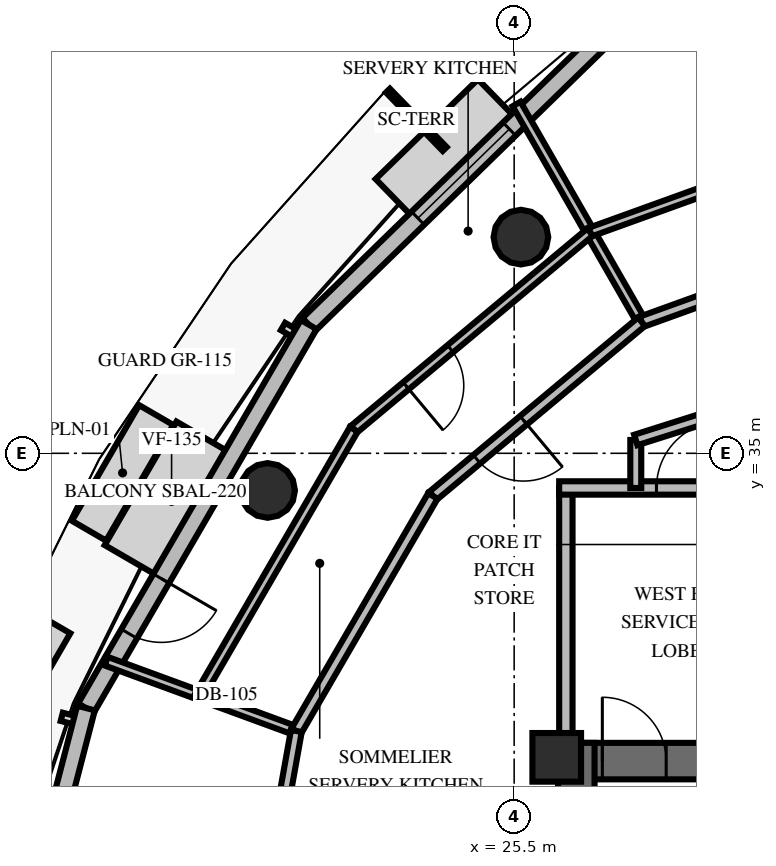
"""IFC4 building model, lengths in metres.
Left out: names, types, materials, properties, quantities, classifications, styles, units other than length and angle.
Written with IfcOpenShell. Run it as: python <this file> out.ifc"""

import sys

from ifc_helpers import new_model, si_unit, direction, frame, frame_2d, origin, origin_2d, place, context, subcontext, project, spatial, rectangle, circle, extrude, element, fill, save


model = new_model("IFC4")
c1 = context("Model", 3, precision=1e-05, world=origin(), true_north=direction((0.0, 1.0)))
c2 = subcontext(c1, "Body", "Model", "MODEL_VIEW")
j1 = project(units=[si_unit("LENGTHUNIT", "METRE"), si_unit("PLANEANGLEUNIT", "RADIAN")], contexts=[c1])
p1 = place(None, origin())
s1 = spatial("IfcSite", under=j1, at=p1, CompositionType="ELEMENT")
p2 = place(p1, origin())
s2 = spatial("IfcBuilding", under=s1, at=p2, CompositionType="ELEMENT")
p3 = place(p2, frame((0.0, 0.0, 277.2)))
s3 = spatial("IfcBuildingStorey", under=s2, at=p3, CompositionType="ELEMENT", Elevation=277.2)
p4 = place(p3, frame((26.222, 29.938, 0.0), z_axis=(0.0, 0.0, 1.0), x_axis=(1.0, 0.0, 0.0)))
e1 = element("IfcWall", 1, at=p4, inside=s3, PredefinedType="SHEAR", context=c2, shape_type="SweptSolid", body=[
    extrude(rectangle(XDim=15.566, YDim=0.6, at=frame_2d((7.783, 0.0))), origin(), (0.0, 0.0, 1.0), 3.6),
])
p5 = place(p4, frame((0.728, 0.0, 0.0)))
e2 = element("IfcOpeningElement", 2, at=p5, cuts=e1, PredefinedType="OPENING", context=c2, shape_type="SweptSolid", body=[
    extrude(rectangle(XDim=1.05, YDim=2.15, at=frame_2d((0.525, 1.075))), frame((0.0, 0.31, 0.0), z_axis=(0.0, -1.0, 0.0), x_axis=(1.0, 0.0, 0.0)), (0.0, 0.0, 1.0), 0.62),
])
p6 = place(p4, frame((13.778, 0.0, 0.0)))
e3 = element("IfcOpeningElement", 3, at=p6, cuts=e1, PredefinedType="OPENING", context=c2, shape_type="SweptSolid", body=[
    extrude(rectangle(XDim=1.05, YDim=2.15, at=frame_2d((0.525, 1.075))), frame((0.0, 0.31, 0.0), z_axis=(0.0, -1.0, 0.0), x_axis=(1.0, 0.0, 0.0)), (0.0, 0.0, 1.0), 0.62),
])
p7 = place(p4, frame((7.228, 0.0, 0.0)))
e4 = element("IfcOpeningElement", 4, at=p7, cuts=e1, PredefinedType="OPENING", context=c2, shape_type="SweptSolid", body=[
    extrude(rectangle(XDim=1.1, YDim=2.15, at=frame_2d((0.55, 1.075))), frame((0.0, 0.31, 0.0), z_axis=(0.0, -1.0, 0.0), x_axis=(1.0, 0.0, 0.0)), (0.0, 0.0, 1.0), 0.62),
])
p8 = place(p3, frame((26.522, 19.962, 0.0), z_axis=(0.0, 0.0, 1.0), x_axis=(0.0, 1.0, 0.0)))
e5 = element("IfcWall", 5, at=p8, inside=s3, PredefinedType="SHEAR", context=c2, shape_type="SweptSolid", body=[
    extrude(rectangle(XDim=10.276, YDim=0.6, at=frame_2d((5.138, 0.0))), origin(), (0.0, 0.0, 1.0), 3.6),
])
p9 = place(p3, frame((26.2, 30.0, 0.0), z_axis=(0.0, 0.0, 1.0), x_axis=(1.0, 0.0, 0.0)))
e6 = element("IfcColumn", 6, at=p9, inside=s3, PredefinedType="PILASTER", context=c2, shape_type="SweptSolid", body=[
    extrude(rectangle(XDim=0.8, YDim=0.8, at=origin_2d()), origin(), (0.0, 0.0, 1.0), 3.6),
])
for number, where, z_axis, x_axis in (
    (7, (25.611, 38.555, 0.0), (0.0, 0.0, 1.0), (1.0, 0.0, 0.0)),
    (8, (21.445, 34.389, 0.0), (0.0, 0.0, 1.0), (1.0, 0.0, 0.0)),
):
    element("IfcColumn", number, at=place(p3, frame(where, z_axis=z_axis, x_axis=x_axis)), inside=s3, PredefinedType="COLUMN", context=c2, shape_type="SweptSolid", body=[
        extrude(circle(Radius=0.45, at=origin_2d()), origin(), (0.0, 0.0, 1.0), 3.6),
    ])
p10 = place(p3, frame((27.217, 42.083, 0.0), z_axis=(0.0, 0.0, 1.0), x_axis=(-0.716208919205, -0.697885939142, 0.0)))
e9 = element("IfcWall", 9, at=p10, inside=s3, PredefinedType="SOLIDWALL", context=c2, shape_type="SweptSolid", body=[
    extrude(rectangle(XDim=7.115, YDim=0.3, at=frame_2d((3.558, 0.0))), origin(), (0.0, 0.0, 1.0), 2.76),
])
p11 = place(p10, frame((2.508, 0.0, 0.8)))
e10 = element("IfcOpeningElement", 10, at=p11, cuts=e9, PredefinedType="OPENING", context=c2, shape_type="SweptSolid", body=[
    extrude(rectangle(XDim=2.1, YDim=1.85, at=frame_2d((1.05, 0.925))), frame((0.0, 0.16, 0.0), z_axis=(0.0, -1.0, 0.0), x_axis=(1.0, 0.0, 0.0)), (0.0, 0.0, 1.0), 0.32),
])
p12 = place(p3, frame((22.121, 37.117, 0.0), z_axis=(0.0, 0.0, 1.0), x_axis=(-0.502255031748, -0.864719540131, 0.0)))
e11 = element("IfcWall", 11, at=p12, inside=s3, PredefinedType="SOLIDWALL", context=c2, shape_type="SweptSolid", body=[
    extrude(rectangle(XDim=7.293, YDim=0.3, at=frame_2d((3.646, 0.0))), origin(), (0.0, 0.0, 1.0), 2.76),
])
p13 = place(p12, frame((4.83, 0.0, 0.0)))
e12 = element("IfcOpeningElement", 12, at=p13, cuts=e11, PredefinedType="OPENING", context=c2, shape_type="SweptSolid", body=[
    extrude(rectangle(XDim=1.05, YDim=2.15, at=frame_2d((0.525, 1.075))), frame((0.0, 0.16, 0.0), z_axis=(0.0, -1.0, 0.0), x_axis=(1.0, 0.0, 0.0)), (0.0, 0.0, 1.0), 0.32),
])
p14 = place(p3, frame((18.458, 30.81, 0.0), z_axis=(0.0, 0.0, 1.0), x_axis=(-0.251374151945, -0.967889991546, 0.0)))
e13 = element("IfcWall", 13, at=p14, inside=s3, PredefinedType="SOLIDWALL", context=c2, shape_type="SweptSolid", body=[
    extrude(rectangle(XDim=7.115, YDim=0.3, at=frame_2d((3.558, 0.0))), origin(), (0.0, 0.0, 1.0), 2.76),
])
p15 = place(p14, frame((2.508, 0.0, 0.8)))
e14 = element("IfcOpeningElement", 14, at=p15, cuts=e13, PredefinedType="OPENING", context=c2, shape_type="SweptSolid", body=[
    extrude(rectangle(XDim=2.1, YDim=1.85, at=frame_2d((1.05, 0.925))), frame((0.0, 0.16, 0.0), z_axis=(0.0, -1.0, 0.0), x_axis=(1.0, 0.0, 0.0)), (0.0, 0.0, 1.0), 0.32),
])
p16 = place(p3, frame((26.35, 30.05, 0.0), z_axis=(0.0, 0.0, 1.0), x_axis=(0.0, 1.0, 0.0)))
e15 = element("IfcWall", 15, at=p16, inside=s3, PredefinedType="SOLIDWALL", context=c2, shape_type="SweptSolid", body=[
    extrude(rectangle(XDim=4.38, YDim=0.22, at=frame_2d((2.19, 0.0))), origin(), (0.0, 0.0, 1.0), 2.46),
])
p17 = place(p3, frame((26.24, 34.43, 0.0), z_axis=(0.0, 0.0, 1.0), x_axis=(1.0, 0.0, 0.0)))
e16 = element("IfcWall", 16, at=p17, inside=s3, PredefinedType="SOLIDWALL", context=c2, shape_type="SweptSolid", body=[
    extrude(rectangle(XDim=4.31, YDim=0.22, at=frame_2d((2.155, 0.0))), origin(), (0.0, 0.0, 1.0), 2.46),
])
p18 = place(p17, frame((1.6, 0.0, 0.0)))
e17 = element("IfcOpeningElement", 17, at=p18, cuts=e16, PredefinedType="OPENING", context=c2, shape_type="SweptSolid", body=[
    extrude(rectangle(XDim=1.1, YDim=2.15, at=frame_2d((0.55, 1.075))), frame((0.0, 0.12, 0.0), z_axis=(0.0, -1.0, 0.0), x_axis=(1.0, 0.0, 0.0)), (0.0, 0.0, 1.0), 0.24),
])
p19 = place(p3, frame((27.5, 34.43, 0.0), z_axis=(0.0, 0.0, 1.0), x_axis=(0.0, 1.0, 0.0)))
e18 = element("IfcWall", 18, at=p19, inside=s3, PredefinedType="PARTITIONING", context=c2, shape_type="SweptSolid", body=[
    extrude(rectangle(XDim=0.789, YDim=0.18, at=frame_2d((0.395, 0.0))), origin(), (0.0, 0.0, 1.0), 2.46),
])
p20 = place(p3, frame((27.5, 35.219, 0.0), z_axis=(0.0, 0.0, 1.0), x_axis=(0.953228121756, 0.302251795518, 0.0)))
e19 = element("IfcWall", 19, at=p20, inside=s3, PredefinedType="PARTITIONING", context=c2, shape_type="SweptSolid", body=[
    extrude(rectangle(XDim=6.819, YDim=0.18, at=frame_2d((3.409, 0.0))), origin(), (0.0, 0.0, 1.0), 2.46),
])
p21 = place(p20, frame((2.86, 0.0, 0.0)))
e20 = element("IfcOpeningElement", 20, at=p21, cuts=e19, PredefinedType="OPENING", context=c2, shape_type="SweptSolid", body=[
    extrude(rectangle(XDim=1.1, YDim=2.15, at=frame_2d((0.55, 1.075))), frame((0.0, 0.1, 0.0), z_axis=(0.0, -1.0, 0.0), x_axis=(1.0, 0.0, 0.0)), (0.0, 0.0, 1.0), 0.2),
])
p22 = place(p3, frame((27.594, 37.163, 0.0), z_axis=(0.0, 0.0, 1.0), x_axis=(-0.497723411818, 0.867335808859, 0.0)))
e21 = element("IfcWall", 21, at=p22, inside=s3, PredefinedType="PARTITIONING", context=c2, shape_type="SweptSolid", body=[
    extrude(rectangle(XDim=4.13, YDim=0.15, at=frame_2d((2.065, 0.0))), origin(), (0.0, 0.0, 1.0), 2.46),
])
p23 = place(p3, frame((31.798, 38.68, 0.0), z_axis=(0.0, 0.0, 1.0), x_axis=(-0.940577162763, -0.339580036057, 0.0)))
e22 = element("IfcWall", 22, at=p23, inside=s3, PredefinedType="PARTITIONING", context=c2, shape_type="SweptSolid", body=[
    extrude(rectangle(XDim=4.47, YDim=0.18, at=frame_2d((2.235, 0.0))), origin(), (0.0, 0.0, 1.0), 2.46),
])
p24 = place(p3, frame((31.508, 40.355, 0.0), z_axis=(0.0, 0.0, 1.0), x_axis=(-0.940582581296, -0.339565027297, 0.0)))
e23 = element("IfcWall", 23, at=p24, inside=s3, PredefinedType="PARTITIONING", context=c2, shape_type="SweptSolid", body=[
    extrude(rectangle(XDim=5.06, YDim=0.15, at=frame_2d((2.53, 0.0))), origin(), (0.0, 0.0, 1.0), 2.46),
])
p25 = place(p3, frame((21.918, 30.433, 0.0), z_axis=(0.0, 0.0, 1.0), x_axis=(-0.938796538143, 0.344472146871, 0.0)))
e24 = element("IfcWall", 24, at=p25, inside=s3, PredefinedType="PARTITIONING", context=c2, shape_type="SweptSolid", body=[
    extrude(rectangle(XDim=3.331, YDim=0.15, at=frame_2d((1.666, 0.0))), origin(), (0.0, 0.0, 1.0), 2.46),
])
p26 = place(p3, frame((27.594, 37.163, 0.0), z_axis=(0.0, 0.0, 1.0), x_axis=(-0.767746496496, -0.640753710187, 0.0)))
e25 = element("IfcWall", 25, at=p26, inside=s3, PredefinedType="PARTITIONING", context=c2, shape_type="SweptSolid", body=[
    extrude(rectangle(XDim=4.47, YDim=0.18, at=frame_2d((2.235, 0.0))), origin(), (0.0, 0.0, 1.0), 2.46),
])
p27 = place(p26, frame((2.527, 0.0, 0.0)))
e26 = element("IfcOpeningElement", 26, at=p27, cuts=e25, PredefinedType="OPENING", context=c2, shape_type="SweptSolid", body=[
    extrude(rectangle(XDim=1.0, YDim=2.15, at=frame_2d((0.5, 1.075))), frame((0.0, 0.1, 0.0), z_axis=(0.0, -1.0, 0.0), x_axis=(1.0, 0.0, 0.0)), (0.0, 0.0, 1.0), 0.2),
])
p28 = place(p3, frame((24.163, 34.299, 0.0), z_axis=(0.0, 0.0, 1.0), x_axis=(-0.502226433787, -0.864736150051, 0.0)))
e27 = element("IfcWall", 27, at=p28, inside=s3, PredefinedType="PARTITIONING", context=c2, shape_type="SweptSolid", body=[
    extrude(rectangle(XDim=4.47, YDim=0.18, at=frame_2d((2.235, 0.0))), origin(), (0.0, 0.0, 1.0), 2.46),
])
p29 = place(p3, frame((26.748, 38.637, 0.0), z_axis=(0.0, 0.0, 1.0), x_axis=(-0.767722747494, -0.640782164999, 0.0)))
e28 = element("IfcWall", 28, at=p29, inside=s3, PredefinedType="PARTITIONING", context=c2, shape_type="SweptSolid", body=[
    extrude(rectangle(XDim=5.06, YDim=0.15, at=frame_2d((2.53, 0.0))), origin(), (0.0, 0.0, 1.0), 2.46),
])
p30 = place(p29, frame((2.993, 0.0, 0.0)))
e29 = element("IfcOpeningElement", 29, at=p30, cuts=e28, PredefinedType="OPENING", context=c2, shape_type="SweptSolid", body=[
    extrude(rectangle(XDim=0.95, YDim=2.15, at=frame_2d((0.475, 1.075))), frame((0.0, 0.085, 0.0), z_axis=(0.0, -1.0, 0.0), x_axis=(1.0, 0.0, 0.0)), (0.0, 0.0, 1.0), 0.17),
])
p31 = place(p3, frame((22.863, 35.395, 0.0), z_axis=(0.0, 0.0, 1.0), x_axis=(-0.502268204586, -0.864711888817, 0.0)))
e30 = element("IfcWall", 30, at=p31, inside=s3, PredefinedType="PARTITIONING", context=c2, shape_type="SweptSolid", body=[
    extrude(rectangle(XDim=5.06, YDim=0.15, at=frame_2d((2.53, 0.0))), origin(), (0.0, 0.0, 1.0), 2.46),
])
p32 = place(p3, frame((21.918, 30.433, 0.0), z_axis=(0.0, 0.0, 1.0), x_axis=(-0.176265133865, -0.98434272618, 0.0)))
e31 = element("IfcWall", 31, at=p32, inside=s3, PredefinedType="PARTITIONING", context=c2, shape_type="SweptSolid", body=[
    extrude(rectangle(XDim=4.47, YDim=0.18, at=frame_2d((2.235, 0.0))), origin(), (0.0, 0.0, 1.0), 2.46),
])
p33 = place(p11, origin())
e32 = element("IfcWindow", 32, at=p33, inside=s3, PartitioningType="SINGLE_PANEL", PredefinedType="WINDOW", context=c2, shape_type="SweptSolid", body=[
    extrude(rectangle(XDim=2.1, YDim=1.85, at=frame_2d((1.05, 0.925))), frame((0.0, 0.03, 0.0), z_axis=(0.0, -1.0, 0.0), x_axis=(1.0, 0.0, 0.0)), (0.0, 0.0, 1.0), 0.06),
])
fill(e10, e32)
p34 = place(p13, origin())
e33 = element("IfcDoor", 33, at=p34, inside=s3, OperationType="SINGLE_SWING_LEFT", PredefinedType="DOOR", context=c2, shape_type="SweptSolid", body=[
    extrude(rectangle(XDim=1.05, YDim=2.15, at=frame_2d((0.525, 1.075))), frame((0.0, 0.025, 0.0), z_axis=(0.0, -1.0, 0.0), x_axis=(1.0, 0.0, 0.0)), (0.0, 0.0, 1.0), 0.05),
])
fill(e12, e33)
p35 = place(p5, origin())
e34 = element("IfcDoor", 34, at=p35, inside=s3, OperationType="SINGLE_SWING_LEFT", PredefinedType="DOOR", context=c2, shape_type="SweptSolid", body=[
    extrude(rectangle(XDim=1.05, YDim=2.15, at=frame_2d((0.525, 1.075))), frame((0.0, 0.025, 0.0), z_axis=(0.0, -1.0, 0.0), x_axis=(1.0, 0.0, 0.0)), (0.0, 0.0, 1.0), 0.05),
])
fill(e2, e34)
p36 = place(p18, origin())
e35 = element("IfcDoor", 35, at=p36, inside=s3, OperationType="SINGLE_SWING_RIGHT", PredefinedType="DOOR", context=c2, shape_type="SweptSolid", body=[
    extrude(rectangle(XDim=1.1, YDim=2.15, at=frame_2d((0.55, 1.075))), frame((0.0, 0.025, 0.0), z_axis=(0.0, -1.0, 0.0), x_axis=(1.0, 0.0, 0.0)), (0.0, 0.0, 1.0), 0.05),
])
fill(e17, e35)
p37 = place(p27, origin())
e36 = element("IfcDoor", 36, at=p37, inside=s3, OperationType="SINGLE_SWING_LEFT", PredefinedType="DOOR", context=c2, shape_type="SweptSolid", body=[
    extrude(rectangle(XDim=1.0, YDim=2.15, at=frame_2d((0.5, 1.075))), frame((0.0, 0.025, 0.0), z_axis=(0.0, -1.0, 0.0), x_axis=(1.0, 0.0, 0.0)), (0.0, 0.0, 1.0), 0.05),
])
fill(e26, e36)
p38 = place(p30, origin())
e37 = element("IfcDoor", 37, at=p38, inside=s3, OperationType="SINGLE_SWING_RIGHT", PredefinedType="DOOR", context=c2, shape_type="SweptSolid", body=[
    extrude(rectangle(XDim=0.95, YDim=2.15, at=frame_2d((0.475, 1.075))), frame((0.0, 0.025, 0.0), z_axis=(0.0, -1.0, 0.0), x_axis=(1.0, 0.0, 0.0)), (0.0, 0.0, 1.0), 0.05),
])
fill(e29, e37)
save(model, sys.argv[1])
